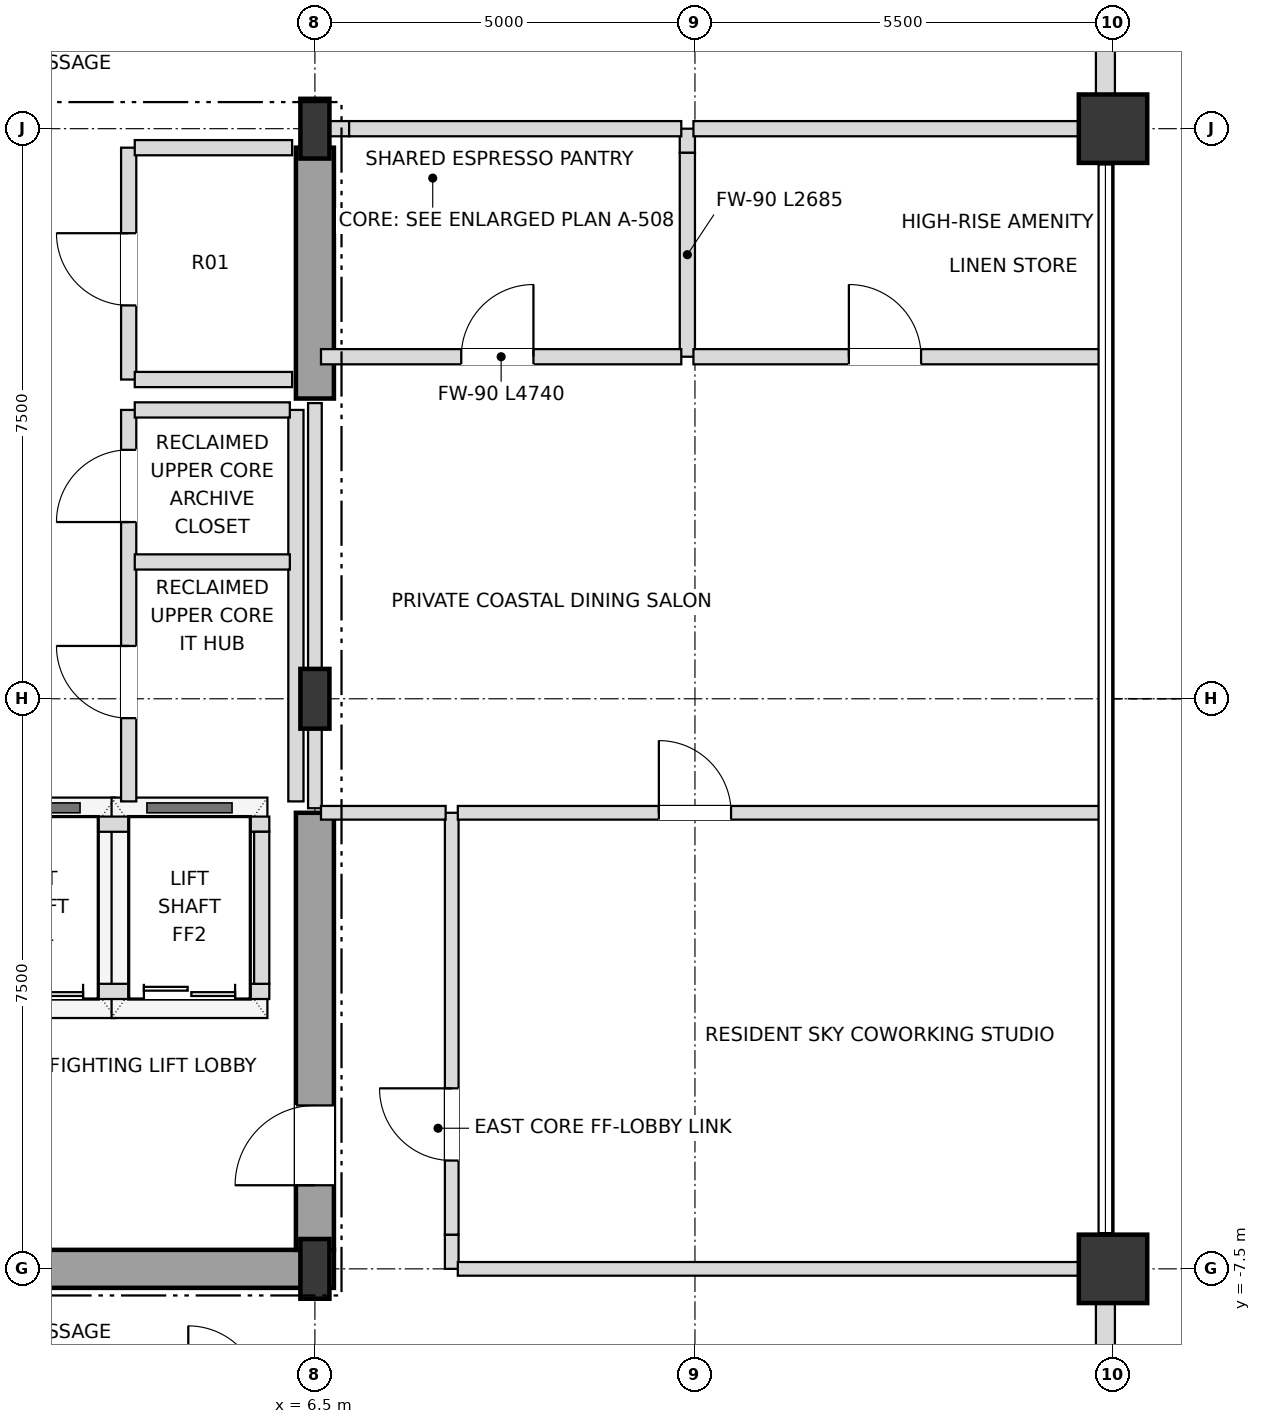
"""IFC4 building model, lengths in metres.
Left out: names, types, materials, properties, quantities, classifications, styles, units other than length and angle.
Written with IfcOpenShell. Run it as: python <this file> out.ifc"""

import sys

from ifc_helpers import new_model, si_unit, direction, frame, frame_2d, origin, origin_2d, place, context, subcontext, project, spatial, rectangle, i_section, extrude, element, fill, save


model = new_model("IFC4")
c1 = context("Model", 3, precision=1e-05, world=origin(), true_north=direction((0.0, 1.0)))
c2 = subcontext(c1, "Body", "Model", "MODEL_VIEW")
j1 = project(units=[si_unit("LENGTHUNIT", "METRE"), si_unit("PLANEANGLEUNIT", "RADIAN")], contexts=[c1])
p1 = place(None, origin())
s1 = spatial("IfcSite", under=j1, at=p1, CompositionType="ELEMENT")
p2 = place(p1, origin())
s2 = spatial("IfcBuilding", under=s1, at=p2, CompositionType="ELEMENT")
p3 = place(p2, frame((0.0, 0.0, 301.5)))
s3 = spatial("IfcBuildingStorey", under=s2, at=p3, CompositionType="ELEMENT", Elevation=301.5)
for number, where, z_axis, x_axis in (
    (1, (6.5, -7.5, 0.0), (0.0, 0.0, 1.0), (1.0, 0.0, 0.0)),
    (2, (6.5, 0.0, 0.0), (0.0, 0.0, 1.0), (1.0, 0.0, 0.0)),
    (3, (6.5, 7.5, 0.0), (0.0, 0.0, 1.0), (1.0, 0.0, 0.0)),
):
    element("IfcColumn", number, at=place(p3, frame(where, z_axis=z_axis, x_axis=x_axis)), inside=s3, PredefinedType="COLUMN", context=c2, shape_type="SweptSolid", body=[
        extrude(i_section(OverallWidth=0.382, OverallDepth=0.786, WebThickness=0.02, FlangeThickness=0.033, at=origin_2d()), origin(), (0.0, 0.0, 1.0), 3.6),
    ])
for number, where, z_axis, x_axis in (
    (4, (17.0, -7.5, 0.0), (0.0, 0.0, 1.0), (1.0, 0.0, 0.0)),
    (5, (17.0, 7.5, 0.0), (0.0, 0.0, 1.0), (1.0, 0.0, 0.0)),
):
    element("IfcColumn", number, at=place(p3, frame(where, z_axis=z_axis, x_axis=x_axis)), inside=s3, PredefinedType="USERDEFINED", context=c2, shape_type="SweptSolid", body=[
        extrude(rectangle(XDim=0.9, YDim=0.9, at=origin_2d()), origin(), (0.0, 0.0, 1.0), 3.6),
    ])
p4 = place(p3, frame((16.9, -12.555, 0.0), z_axis=(0.0, 0.0, 1.0), x_axis=(0.0, 1.0, 0.0)))
e6 = element("IfcWall", 6, at=p4, inside=s3, PredefinedType="SOLIDWALL", context=c2, shape_type="SweptSolid", body=[
    extrude(rectangle(XDim=4.61, YDim=0.25, at=frame_2d((2.305, 0.0))), origin(), (0.0, 0.0, 1.0), 2.668),
])
p5 = place(p4, frame((1.405, 0.0, 0.72)))
e7 = element("IfcOpeningElement", 7, at=p5, cuts=e6, PredefinedType="OPENING", context=c2, shape_type="SweptSolid", body=[
    extrude(rectangle(XDim=1.8, YDim=1.68, at=frame_2d((0.9, 0.84))), frame((0.0, 0.135, 0.0), z_axis=(0.0, -1.0, 0.0), x_axis=(1.0, 0.0, 0.0)), (0.0, 0.0, 1.0), 0.27),
])
p6 = place(p3, frame((16.9, 7.945, 0.0), z_axis=(0.0, 0.0, 1.0), x_axis=(0.0, 1.0, 0.0)))
e8 = element("IfcWall", 8, at=p6, inside=s3, PredefinedType="SOLIDWALL", context=c2, shape_type="SweptSolid", body=[
    extrude(rectangle(XDim=4.61, YDim=0.25, at=frame_2d((2.305, 0.0))), origin(), (0.0, 0.0, 1.0), 2.668),
])
p7 = place(p6, frame((1.405, 0.0, 0.72)))
e9 = element("IfcOpeningElement", 9, at=p7, cuts=e8, PredefinedType="OPENING", context=c2, shape_type="SweptSolid", body=[
    extrude(rectangle(XDim=1.8, YDim=1.68, at=frame_2d((0.9, 0.84))), frame((0.0, 0.135, 0.0), z_axis=(0.0, -1.0, 0.0), x_axis=(1.0, 0.0, 0.0)), (0.0, 0.0, 1.0), 0.27),
])
p8 = place(p3, frame((0.0, -7.5, 0.0), z_axis=(0.0, 0.0, 1.0), x_axis=(1.0, 0.0, 0.0)))
e10 = element("IfcWall", 10, at=p8, inside=s3, PredefinedType="SHEAR", context=c2, shape_type="SweptSolid", body=[
    extrude(rectangle(XDim=6.75, YDim=0.5, at=frame_2d((3.375, 0.0))), origin(), (0.0, 0.0, 1.0), 3.3),
])
p9 = place(p3, frame((6.5, -7.25, 0.0), z_axis=(0.0, 0.0, 1.0), x_axis=(0.0, 1.0, 0.0)))
e11 = element("IfcWall", 11, at=p9, inside=s3, PredefinedType="SHEAR", context=c2, shape_type="SweptSolid", body=[
    extrude(rectangle(XDim=5.75, YDim=0.5, at=frame_2d((2.875, 0.0))), origin(), (0.0, 0.0, 1.0), 3.3),
])
p10 = place(p9, frame((0.85, 0.0, 0.0)))
e12 = element("IfcOpeningElement", 12, at=p10, cuts=e11, PredefinedType="OPENING", context=c2, shape_type="SweptSolid", body=[
    extrude(rectangle(XDim=1.05, YDim=2.15, at=frame_2d((0.525, 1.075))), frame((0.0, 0.26, 0.0), z_axis=(0.0, -1.0, 0.0), x_axis=(1.0, 0.0, 0.0)), (0.0, 0.0, 1.0), 0.52),
])
p11 = place(p3, frame((6.5, 3.95, 0.0), z_axis=(0.0, 0.0, 1.0), x_axis=(0.0, 1.0, 0.0)))
e13 = element("IfcWall", 13, at=p11, inside=s3, PredefinedType="SHEAR", context=c2, shape_type="SweptSolid", body=[
    extrude(rectangle(XDim=3.3, YDim=0.5, at=frame_2d((1.65, 0.0))), origin(), (0.0, 0.0, 1.0), 3.3),
])
p12 = place(p3, frame((1.8, -3.85, 0.0), z_axis=(0.0, 0.0, 1.0), x_axis=(1.0, 0.0, 0.0)))
e14 = element("IfcWall", 14, at=p12, inside=s3, PredefinedType="SOLIDWALL", context=c2, shape_type="SweptSolid", body=[
    extrude(rectangle(XDim=4.1, YDim=0.2, at=frame_2d((2.05, 0.0))), origin(), (0.0, 0.0, 1.0), 3.3),
])
p13 = place(p12, frame((0.45, 0.0, 0.0)))
e15 = element("IfcOpeningElement", 15, at=p13, cuts=e14, PredefinedType="OPENING", context=c2, shape_type="SweptSolid", body=[
    extrude(rectangle(XDim=1.2, YDim=2.2, at=frame_2d((0.6, 1.1))), frame((0.0, 0.11, 0.0), z_axis=(0.0, -1.0, 0.0), x_axis=(1.0, 0.0, 0.0)), (0.0, 0.0, 1.0), 0.22),
])
p14 = place(p12, frame((2.45, 0.0, 0.0)))
e16 = element("IfcOpeningElement", 16, at=p14, cuts=e14, PredefinedType="OPENING", context=c2, shape_type="SweptSolid", body=[
    extrude(rectangle(XDim=1.2, YDim=2.2, at=frame_2d((0.6, 1.1))), frame((0.0, 0.11, 0.0), z_axis=(0.0, -1.0, 0.0), x_axis=(1.0, 0.0, 0.0)), (0.0, 0.0, 1.0), 0.22),
])
p15 = place(p3, frame((1.8, -1.65, 0.0), z_axis=(0.0, 0.0, 1.0), x_axis=(1.0, 0.0, 0.0)))
e17 = element("IfcWall", 17, at=p15, inside=s3, PredefinedType="SOLIDWALL", context=c2, shape_type="SweptSolid", body=[
    extrude(rectangle(XDim=4.1, YDim=0.2, at=frame_2d((2.05, 0.0))), origin(), (0.0, 0.0, 1.0), 3.3),
])
p16 = place(p3, frame((5.8, -3.75, 0.0), z_axis=(0.0, 0.0, 1.0), x_axis=(0.0, 1.0, 0.0)))
e18 = element("IfcWall", 18, at=p16, inside=s3, PredefinedType="SOLIDWALL", context=c2, shape_type="SweptSolid", body=[
    extrude(rectangle(XDim=2.0, YDim=0.2, at=frame_2d((1.0, 0.0))), origin(), (0.0, 0.0, 1.0), 3.3),
])
p17 = place(p3, frame((4.05, -1.35, 0.0), z_axis=(0.0, 0.0, 1.0), x_axis=(0.0, 1.0, 0.0)))
e19 = element("IfcWall", 19, at=p17, inside=s3, PredefinedType="SOLIDWALL", context=c2, shape_type="SweptSolid", body=[
    extrude(rectangle(XDim=5.15, YDim=0.2, at=frame_2d((2.575, 0.0))), origin(), (0.0, 0.0, 1.0), 3.3),
])
p18 = place(p17, frame((1.095, 0.0, 0.0)))
e20 = element("IfcOpeningElement", 20, at=p18, cuts=e19, PredefinedType="OPENING", context=c2, shape_type="SweptSolid", body=[
    extrude(rectangle(XDim=0.95, YDim=2.15, at=frame_2d((0.475, 1.075))), frame((0.0, 0.11, 0.0), z_axis=(0.0, -1.0, 0.0), x_axis=(1.0, 0.0, 0.0)), (0.0, 0.0, 1.0), 0.22),
])
p19 = place(p17, frame((3.675, 0.0, 0.0)))
e21 = element("IfcOpeningElement", 21, at=p19, cuts=e19, PredefinedType="OPENING", context=c2, shape_type="SweptSolid", body=[
    extrude(rectangle(XDim=0.95, YDim=2.15, at=frame_2d((0.475, 1.075))), frame((0.0, 0.11, 0.0), z_axis=(0.0, -1.0, 0.0), x_axis=(1.0, 0.0, 0.0)), (0.0, 0.0, 1.0), 0.22),
])
p20 = place(p3, frame((4.05, 4.2, 0.0), z_axis=(0.0, 0.0, 1.0), x_axis=(0.0, 1.0, 0.0)))
e22 = element("IfcWall", 22, at=p20, inside=s3, PredefinedType="SOLIDWALL", context=c2, shape_type="SweptSolid", body=[
    extrude(rectangle(XDim=3.05, YDim=0.2, at=frame_2d((1.525, 0.0))), origin(), (0.0, 0.0, 1.0), 3.3),
])
p21 = place(p20, frame((0.975, 0.0, 0.0)))
e23 = element("IfcOpeningElement", 23, at=p21, cuts=e22, PredefinedType="OPENING", context=c2, shape_type="SweptSolid", body=[
    extrude(rectangle(XDim=0.95, YDim=2.15, at=frame_2d((0.475, 1.075))), frame((0.0, 0.11, 0.0), z_axis=(0.0, -1.0, 0.0), x_axis=(1.0, 0.0, 0.0)), (0.0, 0.0, 1.0), 0.22),
])
p22 = place(p3, frame((6.25, -1.35, 0.0), z_axis=(0.0, 0.0, 1.0), x_axis=(0.0, 1.0, 0.0)))
e24 = element("IfcWall", 24, at=p22, inside=s3, PredefinedType="SOLIDWALL", context=c2, shape_type="SweptSolid", body=[
    extrude(rectangle(XDim=5.15, YDim=0.2, at=frame_2d((2.575, 0.0))), origin(), (0.0, 0.0, 1.0), 2.353),
])
p23 = place(p3, frame((6.5, -1.44, 0.0), z_axis=(0.0, 0.0, 1.0), x_axis=(0.0, 1.0, 0.0)))
e25 = element("IfcWall", 25, at=p23, inside=s3, PredefinedType="PARTITIONING", context=c2, shape_type="SweptSolid", body=[
    extrude(rectangle(XDim=5.33, YDim=0.18, at=frame_2d((2.665, 0.0))), origin(), (0.0, 0.0, 1.0), 2.353),
])
p24 = place(p3, frame((8.3, -7.5, 0.0), z_axis=(0.0, 0.0, 1.0), x_axis=(0.0, 1.0, 0.0)))
e26 = element("IfcWall", 26, at=p24, inside=s3, PredefinedType="PARTITIONING", context=c2, shape_type="SweptSolid", body=[
    extrude(rectangle(XDim=0.45, YDim=0.18, at=frame_2d((0.225, 0.0))), origin(), (0.0, 0.0, 1.0), 1.485),
])
p25 = place(p3, frame((8.3, -7.05, 0.0), z_axis=(0.0, 0.0, 1.0), x_axis=(0.0, 1.0, 0.0)))
e27 = element("IfcWall", 27, at=p25, inside=s3, PredefinedType="PARTITIONING", context=c2, shape_type="SweptSolid", body=[
    extrude(rectangle(XDim=5.55, YDim=0.18, at=frame_2d((2.775, 0.0))), origin(), (0.0, 0.0, 1.0), 3.3),
])
p26 = place(p25, frame((0.975, 0.0, 0.0)))
e28 = element("IfcOpeningElement", 28, at=p26, cuts=e27, PredefinedType="OPENING", context=c2, shape_type="SweptSolid", body=[
    extrude(rectangle(XDim=0.95, YDim=2.15, at=frame_2d((0.475, 1.075))), frame((0.0, 0.1, 0.0), z_axis=(0.0, -1.0, 0.0), x_axis=(1.0, 0.0, 0.0)), (0.0, 0.0, 1.0), 0.2),
])
p27 = place(p3, frame((11.4, 4.5, 0.0), z_axis=(0.0, 0.0, 1.0), x_axis=(0.0, 1.0, 0.0)))
e29 = element("IfcWall", 29, at=p27, inside=s3, PredefinedType="SOLIDWALL", context=c2, shape_type="SweptSolid", body=[
    extrude(rectangle(XDim=2.685, YDim=0.2, at=frame_2d((1.343, 0.0))), origin(), (0.0, 0.0, 1.0), 2.968),
])
p28 = place(p3, frame((11.4, 7.185, 0.0), z_axis=(0.0, 0.0, 1.0), x_axis=(0.0, 1.0, 0.0)))
e30 = element("IfcWall", 30, at=p28, inside=s3, PredefinedType="SOLIDWALL", context=c2, shape_type="SweptSolid", body=[
    extrude(rectangle(XDim=0.315, YDim=0.2, at=frame_2d((0.157, 0.0))), origin(), (0.0, 0.0, 1.0), 1.485),
])
p29 = place(p3, frame((8.38, -7.5, 0.0), z_axis=(0.0, 0.0, 1.0), x_axis=(1.0, 0.0, 0.0)))
e31 = element("IfcWall", 31, at=p29, inside=s3, PredefinedType="PARTITIONING", context=c2, shape_type="SweptSolid", body=[
    extrude(rectangle(XDim=8.52, YDim=0.18, at=frame_2d((4.26, 0.0))), origin(), (0.0, 0.0, 1.0), 1.485),
])
p30 = place(p3, frame((6.58, -1.5, 0.0), z_axis=(0.0, 0.0, 1.0), x_axis=(1.0, 0.0, 0.0)))
e32 = element("IfcWall", 32, at=p30, inside=s3, PredefinedType="PARTITIONING", context=c2, shape_type="SweptSolid", body=[
    extrude(rectangle(XDim=1.64, YDim=0.18, at=frame_2d((0.82, 0.0))), origin(), (0.0, 0.0, 1.0), 3.3),
])
p31 = place(p3, frame((8.38, -1.5, 0.0), z_axis=(0.0, 0.0, 1.0), x_axis=(1.0, 0.0, 0.0)))
e33 = element("IfcWall", 33, at=p31, inside=s3, PredefinedType="PARTITIONING", context=c2, shape_type="SweptSolid", body=[
    extrude(rectangle(XDim=8.44, YDim=0.18, at=frame_2d((4.22, 0.0))), origin(), (0.0, 0.0, 1.0), 3.3),
])
p32 = place(p31, frame((2.645, 0.0, 0.0)))
e34 = element("IfcOpeningElement", 34, at=p32, cuts=e33, PredefinedType="OPENING", context=c2, shape_type="SweptSolid", body=[
    extrude(rectangle(XDim=0.95, YDim=2.15, at=frame_2d((0.475, 1.075))), frame((0.0, 0.1, 0.0), z_axis=(0.0, -1.0, 0.0), x_axis=(1.0, 0.0, 0.0)), (0.0, 0.0, 1.0), 0.2),
])
for number, where, z_axis, x_axis in (
    (35, (4.13, 1.8, 0.0), (0.0, 0.0, 1.0), (1.0, 0.0, 0.0)),
    (36, (4.13, 3.8, 0.0), (0.0, 0.0, 1.0), (1.0, 0.0, 0.0)),
):
    element("IfcWall", number, at=place(p3, frame(where, z_axis=z_axis, x_axis=x_axis)), inside=s3, PredefinedType="SOLIDWALL", context=c2, shape_type="SweptSolid", body=[
        extrude(rectangle(XDim=2.04, YDim=0.2, at=frame_2d((1.02, 0.0))), origin(), (0.0, 0.0, 1.0), 3.3),
    ])
p33 = place(p3, frame((4.13, 4.2, 0.0), z_axis=(0.0, 0.0, 1.0), x_axis=(1.0, 0.0, 0.0)))
e37 = element("IfcWall", 37, at=p33, inside=s3, PredefinedType="SOLIDWALL", context=c2, shape_type="SweptSolid", body=[
    extrude(rectangle(XDim=2.07, YDim=0.2, at=frame_2d((1.035, 0.0))), origin(), (0.0, 0.0, 1.0), 3.3),
])
p34 = place(p3, frame((6.58, 4.5, 0.0), z_axis=(0.0, 0.0, 1.0), x_axis=(1.0, 0.0, 0.0)))
e38 = element("IfcWall", 38, at=p34, inside=s3, PredefinedType="SOLIDWALL", context=c2, shape_type="SweptSolid", body=[
    extrude(rectangle(XDim=4.74, YDim=0.2, at=frame_2d((2.37, 0.0))), origin(), (0.0, 0.0, 1.0), 3.3),
])
p35 = place(p34, frame((1.845, 0.0, 0.0)))
e39 = element("IfcOpeningElement", 39, at=p35, cuts=e38, PredefinedType="OPENING", context=c2, shape_type="SweptSolid", body=[
    extrude(rectangle(XDim=0.95, YDim=2.15, at=frame_2d((0.475, 1.075))), frame((0.0, 0.11, 0.0), z_axis=(0.0, -1.0, 0.0), x_axis=(1.0, 0.0, 0.0)), (0.0, 0.0, 1.0), 0.22),
])
p36 = place(p3, frame((11.48, 4.5, 0.0), z_axis=(0.0, 0.0, 1.0), x_axis=(1.0, 0.0, 0.0)))
e40 = element("IfcWall", 40, at=p36, inside=s3, PredefinedType="SOLIDWALL", context=c2, shape_type="SweptSolid", body=[
    extrude(rectangle(XDim=5.34, YDim=0.2, at=frame_2d((2.67, 0.0))), origin(), (0.0, 0.0, 1.0), 3.3),
])
p37 = place(p36, frame((2.045, 0.0, 0.0)))
e41 = element("IfcOpeningElement", 41, at=p37, cuts=e40, PredefinedType="OPENING", context=c2, shape_type="SweptSolid", body=[
    extrude(rectangle(XDim=0.95, YDim=2.15, at=frame_2d((0.475, 1.075))), frame((0.0, 0.11, 0.0), z_axis=(0.0, -1.0, 0.0), x_axis=(1.0, 0.0, 0.0)), (0.0, 0.0, 1.0), 0.22),
])
p38 = place(p3, frame((4.13, 7.25, 0.0), z_axis=(0.0, 0.0, 1.0), x_axis=(1.0, 0.0, 0.0)))
e42 = element("IfcWall", 42, at=p38, inside=s3, PredefinedType="SOLIDWALL", context=c2, shape_type="SweptSolid", body=[
    extrude(rectangle(XDim=2.07, YDim=0.2, at=frame_2d((1.035, 0.0))), origin(), (0.0, 0.0, 1.0), 2.353),
])
p39 = place(p3, frame((6.5, 7.5, 0.0), z_axis=(0.0, 0.0, 1.0), x_axis=(1.0, 0.0, 0.0)))
e43 = element("IfcWall", 43, at=p39, inside=s3, PredefinedType="SOLIDWALL", context=c2, shape_type="SweptSolid", body=[
    extrude(rectangle(XDim=0.45, YDim=0.2, at=frame_2d((0.225, 0.0))), origin(), (0.0, 0.0, 1.0), 1.485),
])
p40 = place(p3, frame((6.95, 7.5, 0.0), z_axis=(0.0, 0.0, 1.0), x_axis=(1.0, 0.0, 0.0)))
e44 = element("IfcWall", 44, at=p40, inside=s3, PredefinedType="SOLIDWALL", context=c2, shape_type="SweptSolid", body=[
    extrude(rectangle(XDim=4.37, YDim=0.2, at=frame_2d((2.185, 0.0))), origin(), (0.0, 0.0, 1.0), 1.485),
])
p41 = place(p3, frame((11.48, 7.5, 0.0), z_axis=(0.0, 0.0, 1.0), x_axis=(1.0, 0.0, 0.0)))
e45 = element("IfcWall", 45, at=p41, inside=s3, PredefinedType="SOLIDWALL", context=c2, shape_type="SweptSolid", body=[
    extrude(rectangle(XDim=5.42, YDim=0.2, at=frame_2d((2.71, 0.0))), origin(), (0.0, 0.0, 1.0), 1.485),
])
p42 = place(p10, origin())
e46 = element("IfcDoor", 46, at=p42, inside=s3, OperationType="SINGLE_SWING_LEFT", PredefinedType="DOOR", context=c2, shape_type="SweptSolid", body=[
    extrude(rectangle(XDim=1.05, YDim=2.15, at=frame_2d((0.525, 1.075))), frame((0.0, 0.025, 0.0), z_axis=(0.0, -1.0, 0.0), x_axis=(1.0, 0.0, 0.0)), (0.0, 0.0, 1.0), 0.05),
])
fill(e12, e46)
p43 = place(p13, origin())
e47 = element("IfcDoor", 47, at=p43, inside=s3, OperationType="DOUBLE_DOOR_SLIDING", PredefinedType="DOOR", context=c2, shape_type="SweptSolid", body=[
    extrude(rectangle(XDim=1.2, YDim=2.2, at=frame_2d((0.6, 1.1))), frame((0.0, 0.025, 0.0), z_axis=(0.0, -1.0, 0.0), x_axis=(1.0, 0.0, 0.0)), (0.0, 0.0, 1.0), 0.05),
])
fill(e15, e47)
p44 = place(p14, origin())
e48 = element("IfcDoor", 48, at=p44, inside=s3, OperationType="DOUBLE_DOOR_SLIDING", PredefinedType="DOOR", context=c2, shape_type="SweptSolid", body=[
    extrude(rectangle(XDim=1.2, YDim=2.2, at=frame_2d((0.6, 1.1))), frame((0.0, 0.025, 0.0), z_axis=(0.0, -1.0, 0.0), x_axis=(1.0, 0.0, 0.0)), (0.0, 0.0, 1.0), 0.05),
])
fill(e16, e48)
p45 = place(p18, origin())
e49 = element("IfcDoor", 49, at=p45, inside=s3, OperationType="SINGLE_SWING_RIGHT", PredefinedType="DOOR", context=c2, shape_type="SweptSolid", body=[
    extrude(rectangle(XDim=0.95, YDim=2.15, at=frame_2d((0.475, 1.075))), frame((0.0, 0.025, 0.0), z_axis=(0.0, -1.0, 0.0), x_axis=(1.0, 0.0, 0.0)), (0.0, 0.0, 1.0), 0.05),
])
fill(e20, e49)
p46 = place(p19, origin())
e50 = element("IfcDoor", 50, at=p46, inside=s3, OperationType="SINGLE_SWING_LEFT", PredefinedType="DOOR", context=c2, shape_type="SweptSolid", body=[
    extrude(rectangle(XDim=0.95, YDim=2.15, at=frame_2d((0.475, 1.075))), frame((0.0, 0.025, 0.0), z_axis=(0.0, -1.0, 0.0), x_axis=(1.0, 0.0, 0.0)), (0.0, 0.0, 1.0), 0.05),
])
fill(e21, e50)
p47 = place(p21, origin())
e51 = element("IfcDoor", 51, at=p47, inside=s3, OperationType="SINGLE_SWING_RIGHT", PredefinedType="DOOR", context=c2, shape_type="SweptSolid", body=[
    extrude(rectangle(XDim=0.95, YDim=2.15, at=frame_2d((0.475, 1.075))), frame((0.0, 0.025, 0.0), z_axis=(0.0, -1.0, 0.0), x_axis=(1.0, 0.0, 0.0)), (0.0, 0.0, 1.0), 0.05),
])
fill(e23, e51)
p48 = place(p26, origin())
e52 = element("IfcDoor", 52, at=p48, inside=s3, OperationType="SINGLE_SWING_RIGHT", PredefinedType="DOOR", context=c2, shape_type="SweptSolid", body=[
    extrude(rectangle(XDim=0.95, YDim=2.15, at=frame_2d((0.475, 1.075))), frame((0.0, 0.025, 0.0), z_axis=(0.0, -1.0, 0.0), x_axis=(1.0, 0.0, 0.0)), (0.0, 0.0, 1.0), 0.05),
])
fill(e28, e52)
p49 = place(p32, origin())
e53 = element("IfcDoor", 53, at=p49, inside=s3, OperationType="SINGLE_SWING_LEFT", PredefinedType="DOOR", context=c2, shape_type="SweptSolid", body=[
    extrude(rectangle(XDim=0.95, YDim=2.15, at=frame_2d((0.475, 1.075))), frame((0.0, 0.025, 0.0), z_axis=(0.0, -1.0, 0.0), x_axis=(1.0, 0.0, 0.0)), (0.0, 0.0, 1.0), 0.05),
])
fill(e34, e53)
p50 = place(p35, origin())
e54 = element("IfcDoor", 54, at=p50, inside=s3, OperationType="SINGLE_SWING_RIGHT", PredefinedType="DOOR", context=c2, shape_type="SweptSolid", body=[
    extrude(rectangle(XDim=0.95, YDim=2.15, at=frame_2d((0.475, 1.075))), frame((0.0, 0.025, 0.0), z_axis=(0.0, -1.0, 0.0), x_axis=(1.0, 0.0, 0.0)), (0.0, 0.0, 1.0), 0.05),
])
fill(e39, e54)
p51 = place(p37, origin())
e55 = element("IfcDoor", 55, at=p51, inside=s3, OperationType="SINGLE_SWING_LEFT", PredefinedType="DOOR", context=c2, shape_type="SweptSolid", body=[
    extrude(rectangle(XDim=0.95, YDim=2.15, at=frame_2d((0.475, 1.075))), frame((0.0, 0.025, 0.0), z_axis=(0.0, -1.0, 0.0), x_axis=(1.0, 0.0, 0.0)), (0.0, 0.0, 1.0), 0.05),
])
fill(e41, e55)
save(model, sys.argv[1])
